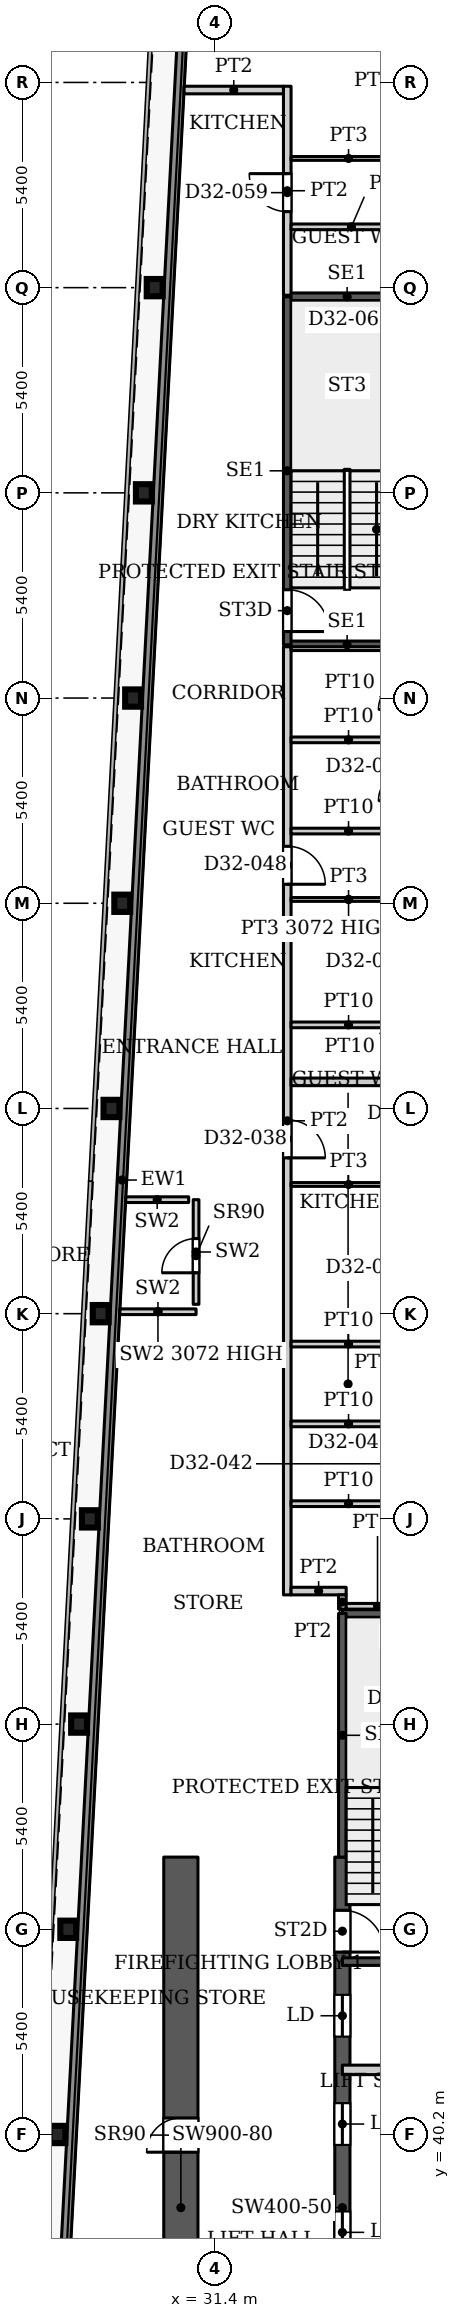
"""IFC4 building model, lengths in metres.
Left out: names, types, materials, properties, quantities, classifications, styles, units other than length and angle.
Written with IfcOpenShell. Run it as: python <this file> out.ifc"""

import sys

from ifc_helpers import new_model, si_unit, direction, frame, frame_2d, origin, origin_2d, place, context, subcontext, project, spatial, rectangle, i_section, extrude, source, transform, mapped, element, fill, save


model = new_model("IFC4")
c1 = context("Model", 3, precision=1e-05, world=origin(), true_north=direction((0.0, 1.0)))
c2 = subcontext(c1, "Body", "Model", "MODEL_VIEW")
j1 = project(units=[si_unit("LENGTHUNIT", "METRE"), si_unit("PLANEANGLEUNIT", "RADIAN")], contexts=[c1])
p1 = place(None, origin())
s1 = spatial("IfcSite", under=j1, at=p1, CompositionType="ELEMENT")
p2 = place(p1, origin())
s2 = spatial("IfcBuilding", under=s1, at=p2, CompositionType="ELEMENT")
p3 = place(p2, frame((0.0, 0.0, 140.9)))
s3 = spatial("IfcBuildingStorey", under=s2, at=p3, CompositionType="ELEMENT", Elevation=140.9)
for number, where, z_axis, x_axis in (
    (1, (27.253, 40.2, 0.0), (0.0, 0.0, 1.0), (1.0, 0.0, 0.0)),
    (2, (27.537, 45.6, 0.0), (0.0, 0.0, 1.0), (1.0, 0.0, 0.0)),
    (3, (27.822, 51.0, 0.0), (0.0, 0.0, 1.0), (1.0, 0.0, 0.0)),
    (4, (28.106, 56.4, 0.0), (0.0, 0.0, 1.0), (1.0, 0.0, 0.0)),
    (5, (28.39, 61.8, 0.0), (0.0, 0.0, 1.0), (1.0, 0.0, 0.0)),
    (6, (28.674, 67.2, 0.0), (0.0, 0.0, 1.0), (1.0, 0.0, 0.0)),
    (7, (28.958, 72.6, 0.0), (0.0, 0.0, 1.0), (1.0, 0.0, 0.0)),
    (8, (29.243, 78.0, 0.0), (0.0, 0.0, 1.0), (1.0, 0.0, 0.0)),
    (9, (29.527, 83.4, 0.0), (0.0, 0.0, 1.0), (1.0, 0.0, 0.0)),
    (10, (29.811, 88.8, 0.0), (0.0, 0.0, 1.0), (1.0, 0.0, 0.0)),
):
    element("IfcColumn", number, at=place(p3, frame(where, z_axis=z_axis, x_axis=x_axis)), inside=s3, PredefinedType="COLUMN", context=c2, shape_type="SweptSolid", body=[
        extrude(i_section(OverallWidth=0.418, OverallDepth=0.455, WebThickness=0.042, FlangeThickness=0.068, FilletRadius=0.014, at=origin_2d()), origin(), (0.0, 0.0, 1.0), 3.9),
    ])
p4 = place(p3, frame((34.75, 29.05, 0.0), z_axis=(0.0, 0.0, 1.0), x_axis=(0.0, 1.0, 0.0)))
e11 = element("IfcWall", 11, at=p4, inside=s3, PredefinedType="SHEAR", context=c2, shape_type="SweptSolid", body=[
    extrude(rectangle(XDim=18.45, YDim=0.4, at=frame_2d((9.225, 0.0))), origin(), (0.0, 0.0, 1.0), 3.9),
])
p5 = place(p4, frame((8.025, 0.0, 0.0)))
e12 = element("IfcOpeningElement", 12, at=p5, cuts=e11, PredefinedType="OPENING", context=c2, shape_type="SweptSolid", body=[
    extrude(rectangle(XDim=1.1, YDim=2.2, at=frame_2d((0.55, 1.1))), frame((0.0, 0.21, 0.0), z_axis=(0.0, -1.0, 0.0), x_axis=(1.0, 0.0, 0.0)), (0.0, 0.0, 1.0), 0.42),
])
p6 = place(p4, frame((10.875, 0.0, 0.0)))
e13 = element("IfcOpeningElement", 13, at=p6, cuts=e11, PredefinedType="OPENING", context=c2, shape_type="SweptSolid", body=[
    extrude(rectangle(XDim=1.1, YDim=2.2, at=frame_2d((0.55, 1.1))), frame((0.0, 0.21, 0.0), z_axis=(0.0, -1.0, 0.0), x_axis=(1.0, 0.0, 0.0)), (0.0, 0.0, 1.0), 0.42),
])
p7 = place(p4, frame((13.725, 0.0, 0.0)))
e14 = element("IfcOpeningElement", 14, at=p7, cuts=e11, PredefinedType="OPENING", context=c2, shape_type="SweptSolid", body=[
    extrude(rectangle(XDim=1.1, YDim=2.2, at=frame_2d((0.55, 1.1))), frame((0.0, 0.21, 0.0), z_axis=(0.0, -1.0, 0.0), x_axis=(1.0, 0.0, 0.0)), (0.0, 0.0, 1.0), 0.42),
])
p8 = place(p4, frame((15.95, 0.0, 0.0)))
e15 = element("IfcOpeningElement", 15, at=p8, cuts=e11, PredefinedType="OPENING", context=c2, shape_type="SweptSolid", body=[
    extrude(rectangle(XDim=1.1, YDim=2.2, at=frame_2d((0.55, 1.1))), frame((0.0, 0.21, 0.0), z_axis=(0.0, -1.0, 0.0), x_axis=(1.0, 0.0, 0.0)), (0.0, 0.0, 1.0), 0.42),
])
p9 = place(p3, frame((30.5, 29.05, 0.0), z_axis=(0.0, 0.0, 1.0), x_axis=(0.0, 1.0, 0.0)))
e16 = element("IfcWall", 16, at=p9, inside=s3, PredefinedType="SHEAR", context=c2, shape_type="SweptSolid", body=[
    extrude(rectangle(XDim=18.45, YDim=0.9, at=frame_2d((9.225, 0.0))), origin(), (0.0, 0.0, 1.0), 3.9),
])
p10 = place(p9, frame((6.21, 0.0, 0.0)))
e17 = element("IfcOpeningElement", 17, at=p10, cuts=e16, PredefinedType="OPENING", context=c2, shape_type="SweptSolid", body=[
    extrude(rectangle(XDim=0.9, YDim=2.2, at=frame_2d((0.45, 1.1))), frame((0.0, 0.46, 0.0), z_axis=(0.0, -1.0, 0.0), x_axis=(1.0, 0.0, 0.0)), (0.0, 0.0, 1.0), 0.92),
])
p11 = place(p9, frame((10.684, 0.0, 0.0)))
e18 = element("IfcOpeningElement", 18, at=p11, cuts=e16, PredefinedType="OPENING", context=c2, shape_type="SweptSolid", body=[
    extrude(rectangle(XDim=0.9, YDim=2.2, at=frame_2d((0.45, 1.1))), frame((0.0, 0.46, 0.0), z_axis=(0.0, -1.0, 0.0), x_axis=(1.0, 0.0, 0.0)), (0.0, 0.0, 1.0), 0.92),
])
p12 = place(p3, frame((27.195, 31.969, 0.0), z_axis=(0.0, 0.0, 1.0), x_axis=(0.052554995867, 0.998618031286, 0.0)))
e19 = element("IfcWall", 19, at=p12, inside=s3, PredefinedType="SOLIDWALL", context=c2, shape_type="SweptSolid", body=[
    extrude(rectangle(XDim=66.787, YDim=0.25, at=frame_2d((33.394, 0.0))), origin(), (0.0, 0.0, 1.0), 3.75),
])
for number, where, z_axis, x_axis in (
    (20, (34.75, 44.75, 0.0), (0.0, 0.0, 1.0), (1.0, 0.0, 0.0)),
    (21, (34.75, 53.91, 0.0), (0.0, 0.0, 1.0), (1.0, 0.0, 0.0)),
):
    element("IfcWall", number, at=place(p3, frame(where, z_axis=z_axis, x_axis=x_axis)), inside=s3, PredefinedType="SHEAR", context=c2, shape_type="SweptSolid", body=[
        extrude(rectangle(XDim=3.15, YDim=0.2, at=frame_2d((1.575, 0.0))), origin(), (0.0, 0.0, 1.0), 3.9),
    ])
p13 = place(p3, frame((34.75, 47.5, 0.0), z_axis=(0.0, 0.0, 1.0), x_axis=(0.0, 1.0, 0.0)))
e22 = element("IfcWall", 22, at=p13, inside=s3, PredefinedType="SHEAR", context=c2, shape_type="SweptSolid", body=[
    extrude(rectangle(XDim=6.41, YDim=0.2, at=frame_2d((3.205, 0.0))), origin(), (0.0, 0.0, 1.0), 3.9),
])
for number, where, z_axis, x_axis in (
    (23, (33.3, 79.4, 0.0), (0.0, 0.0, 1.0), (1.0, 0.0, 0.0)),
    (24, (33.3, 88.56, 0.0), (0.0, 0.0, 1.0), (1.0, 0.0, 0.0)),
):
    element("IfcWall", number, at=place(p3, frame(where, z_axis=z_axis, x_axis=x_axis)), inside=s3, PredefinedType="SHEAR", context=c2, shape_type="SweptSolid", body=[
        extrude(rectangle(XDim=3.15, YDim=0.2, at=frame_2d((1.575, 0.0))), origin(), (0.0, 0.0, 1.0), 3.9),
    ])
p14 = place(p3, frame((33.3, 79.4, 0.0), z_axis=(0.0, 0.0, 1.0), x_axis=(0.0, 1.0, 0.0)))
e25 = element("IfcWall", 25, at=p14, inside=s3, PredefinedType="SHEAR", context=c2, shape_type="SweptSolid", body=[
    extrude(rectangle(XDim=9.16, YDim=0.2, at=frame_2d((4.58, 0.0))), origin(), (0.0, 0.0, 1.0), 3.9),
])
p15 = place(p14, frame((0.35, 0.0, 0.0)))
e26 = element("IfcOpeningElement", 26, at=p15, cuts=e25, PredefinedType="OPENING", context=c2, shape_type="SweptSolid", body=[
    extrude(rectangle(XDim=1.1, YDim=2.2, at=frame_2d((0.55, 1.1))), frame((0.0, 0.11, 0.0), z_axis=(0.0, -1.0, 0.0), x_axis=(1.0, 0.0, 0.0)), (0.0, 0.0, 1.0), 0.22),
])
p16 = place(p3, frame((34.75, 41.9, 0.0), z_axis=(0.0, 0.0, 1.0), x_axis=(1.0, 0.0, 0.0)))
e27 = element("IfcWall", 27, at=p16, inside=s3, PredefinedType="PARTITIONING", context=c2, shape_type="SweptSolid", body=[
    extrude(rectangle(XDim=3.25, YDim=0.25, at=frame_2d((1.625, 0.0))), origin(), (0.0, 0.0, 1.0), 3.9),
])
p17 = place(p3, frame((28.895, 61.851, 0.0), z_axis=(0.0, 0.0, 1.0), x_axis=(1.0, 0.0, 0.0)))
e28 = element("IfcWall", 28, at=p17, inside=s3, PredefinedType="PARTITIONING", context=c2, shape_type="SweptSolid", body=[
    extrude(rectangle(XDim=2.005, YDim=0.15, at=frame_2d((1.002, 0.0))), origin(), (0.0, 0.0, 1.0), 3.072),
])
p18 = place(p3, frame((30.9, 62.046, 0.0), z_axis=(0.0, 0.0, 1.0), x_axis=(0.0, 1.0, 0.0)))
e29 = element("IfcWall", 29, at=p18, inside=s3, PredefinedType="PARTITIONING", context=c2, shape_type="SweptSolid", body=[
    extrude(rectangle(XDim=2.754, YDim=0.15, at=frame_2d((1.377, 0.0))), origin(), (0.0, 0.0, 1.0), 3.9),
])
p19 = place(p18, frame((0.83, 0.0, 0.0)))
e30 = element("IfcOpeningElement", 30, at=p19, cuts=e29, PredefinedType="OPENING", context=c2, shape_type="SweptSolid", body=[
    extrude(rectangle(XDim=0.9, YDim=2.2, at=frame_2d((0.45, 1.1))), frame((0.0, 0.085, 0.0), z_axis=(0.0, -1.0, 0.0), x_axis=(1.0, 0.0, 0.0)), (0.0, 0.0, 1.0), 0.17),
])
p20 = place(p3, frame((29.05, 64.8, 0.0), z_axis=(0.0, 0.0, 1.0), x_axis=(1.0, 0.0, 0.0)))
e31 = element("IfcWall", 31, at=p20, inside=s3, PredefinedType="PARTITIONING", context=c2, shape_type="SweptSolid", body=[
    extrude(rectangle(XDim=1.655, YDim=0.15, at=frame_2d((0.828, 0.0))), origin(), (0.0, 0.0, 1.0), 3.9),
])
p21 = place(p3, frame((30.585, 94.0, 0.0), z_axis=(0.0, 0.0, 1.0), x_axis=(1.0, 0.0, 0.0)))
e32 = element("IfcWall", 32, at=p21, inside=s3, PredefinedType="PARTITIONING", context=c2, shape_type="SweptSolid", body=[
    extrude(rectangle(XDim=2.615, YDim=0.2, at=frame_2d((1.308, 0.0))), origin(), (0.0, 0.0, 1.0), 3.6),
])
p22 = place(p3, frame((33.3, 54.4, 0.0), z_axis=(0.0, 0.0, 1.0), x_axis=(0.0, 1.0, 0.0)))
e33 = element("IfcWall", 33, at=p22, inside=s3, PredefinedType="PARTITIONING", context=c2, shape_type="SweptSolid", body=[
    extrude(rectangle(XDim=24.95, YDim=0.2, at=frame_2d((12.475, 0.0))), origin(), (0.0, 0.0, 1.0), 3.6),
])
p23 = place(p22, frame((11.5, 0.0, 0.0)))
e34 = element("IfcOpeningElement", 34, at=p23, cuts=e33, PredefinedType="OPENING", context=c2, shape_type="SweptSolid", body=[
    extrude(rectangle(XDim=1.0, YDim=2.1, at=frame_2d((0.5, 1.05))), frame((0.0, 0.11, 0.0), z_axis=(0.0, -1.0, 0.0), x_axis=(1.0, 0.0, 0.0)), (0.0, 0.0, 1.0), 0.22),
])
p24 = place(p22, frame((18.7, 0.0, 0.0)))
e35 = element("IfcOpeningElement", 35, at=p24, cuts=e33, PredefinedType="OPENING", context=c2, shape_type="SweptSolid", body=[
    extrude(rectangle(XDim=1.0, YDim=2.1, at=frame_2d((0.5, 1.05))), frame((0.0, 0.11, 0.0), z_axis=(0.0, -1.0, 0.0), x_axis=(1.0, 0.0, 0.0)), (0.0, 0.0, 1.0), 0.22),
])
p25 = place(p3, frame((33.3, 88.6, 0.0), z_axis=(0.0, 0.0, 1.0), x_axis=(0.0, 1.0, 0.0)))
e36 = element("IfcWall", 36, at=p25, inside=s3, PredefinedType="PARTITIONING", context=c2, shape_type="SweptSolid", body=[
    extrude(rectangle(XDim=5.5, YDim=0.2, at=frame_2d((2.75, 0.0))), origin(), (0.0, 0.0, 1.0), 3.6),
])
p26 = place(p25, frame((2.2, 0.0, 0.0)))
e37 = element("IfcOpeningElement", 37, at=p26, cuts=e36, PredefinedType="OPENING", context=c2, shape_type="SweptSolid", body=[
    extrude(rectangle(XDim=1.0, YDim=2.1, at=frame_2d((0.5, 1.05))), frame((0.0, 0.11, 0.0), z_axis=(0.0, -1.0, 0.0), x_axis=(1.0, 0.0, 0.0)), (0.0, 0.0, 1.0), 0.22),
])
p27 = place(p3, frame((33.4, 54.5, 0.0), z_axis=(0.0, 0.0, 1.0), x_axis=(1.0, 0.0, 0.0)))
e38 = element("IfcWall", 38, at=p27, inside=s3, PredefinedType="PARTITIONING", context=c2, shape_type="SweptSolid", body=[
    extrude(rectangle(XDim=1.45, YDim=0.2, at=frame_2d((0.725, 0.0))), origin(), (0.0, 0.0, 1.0), 3.6),
])
for number, where, z_axis, x_axis in (
    (39, (33.4, 56.8, 0.0), (0.0, 0.0, 1.0), (1.0, 0.0, 0.0)),
    (40, (33.4, 58.9, 0.0), (0.0, 0.0, 1.0), (1.0, 0.0, 0.0)),
    (41, (33.4, 61.0, 0.0), (0.0, 0.0, 1.0), (1.0, 0.0, 0.0)),
):
    element("IfcWall", number, at=place(p3, frame(where, z_axis=z_axis, x_axis=x_axis)), inside=s3, PredefinedType="PARTITIONING", context=c2, shape_type="SweptSolid", body=[
        extrude(rectangle(XDim=3.025, YDim=0.15, at=frame_2d((1.513, 0.0))), origin(), (0.0, 0.0, 1.0), 3.6),
    ])
p28 = place(p3, frame((33.4, 65.2, 0.0), z_axis=(0.0, 0.0, 1.0), x_axis=(1.0, 0.0, 0.0)))
e42 = element("IfcWall", 42, at=p28, inside=s3, PredefinedType="PARTITIONING", context=c2, shape_type="SweptSolid", body=[
    extrude(rectangle(XDim=3.025, YDim=0.1, at=frame_2d((1.513, 0.0))), origin(), (0.0, 0.0, 1.0), 3.6),
])
p29 = place(p3, frame((33.4, 67.9, 0.0), z_axis=(0.0, 0.0, 1.0), x_axis=(1.0, 0.0, 0.0)))
e43 = element("IfcWall", 43, at=p29, inside=s3, PredefinedType="PARTITIONING", context=c2, shape_type="SweptSolid", body=[
    extrude(rectangle(XDim=12.5, YDim=0.2, at=frame_2d((6.25, 0.0))), origin(), (0.0, 0.0, 1.0), 3.6),
])
p30 = place(p3, frame((33.4, 69.4, 0.0), z_axis=(0.0, 0.0, 1.0), x_axis=(1.0, 0.0, 0.0)))
e44 = element("IfcWall", 44, at=p30, inside=s3, PredefinedType="PARTITIONING", context=c2, shape_type="SweptSolid", body=[
    extrude(rectangle(XDim=3.025, YDim=0.15, at=frame_2d((1.513, 0.0))), origin(), (0.0, 0.0, 1.0), 3.6),
])
p31 = place(p3, frame((33.4, 72.7, 0.0), z_axis=(0.0, 0.0, 1.0), x_axis=(1.0, 0.0, 0.0)))
e45 = element("IfcWall", 45, at=p31, inside=s3, PredefinedType="PARTITIONING", context=c2, shape_type="SweptSolid", body=[
    extrude(rectangle(XDim=3.025, YDim=0.1, at=frame_2d((1.513, 0.0))), origin(), (0.0, 0.0, 1.0), 3.072),
])
for number, where, z_axis, x_axis in (
    (46, (33.4, 74.5, 0.0), (0.0, 0.0, 1.0), (1.0, 0.0, 0.0)),
    (47, (33.4, 76.9, 0.0), (0.0, 0.0, 1.0), (1.0, 0.0, 0.0)),
):
    element("IfcWall", number, at=place(p3, frame(where, z_axis=z_axis, x_axis=x_axis)), inside=s3, PredefinedType="PARTITIONING", context=c2, shape_type="SweptSolid", body=[
        extrude(rectangle(XDim=3.025, YDim=0.15, at=frame_2d((1.513, 0.0))), origin(), (0.0, 0.0, 1.0), 3.6),
    ])
p32 = place(p3, frame((33.4, 79.3, 0.0), z_axis=(0.0, 0.0, 1.0), x_axis=(1.0, 0.0, 0.0)))
e48 = element("IfcWall", 48, at=p32, inside=s3, PredefinedType="PARTITIONING", context=c2, shape_type="SweptSolid", body=[
    extrude(rectangle(XDim=12.5, YDim=0.1, at=frame_2d((6.25, 0.0))), origin(), (0.0, 0.0, 1.0), 3.6),
])
p33 = place(p32, frame((3.355, 0.0, 0.0)))
e49 = element("IfcOpeningElement", 49, at=p33, cuts=e48, PredefinedType="OPENING", context=c2, shape_type="SweptSolid", body=[
    extrude(rectangle(XDim=0.9, YDim=2.1, at=frame_2d((0.45, 1.05))), frame((0.0, 0.06, 0.0), z_axis=(0.0, -1.0, 0.0), x_axis=(1.0, 0.0, 0.0)), (0.0, 0.0, 1.0), 0.12),
])
p34 = place(p3, frame((33.4, 90.4, 0.0), z_axis=(0.0, 0.0, 1.0), x_axis=(1.0, 0.0, 0.0)))
e50 = element("IfcWall", 50, at=p34, inside=s3, PredefinedType="PARTITIONING", context=c2, shape_type="SweptSolid", body=[
    extrude(rectangle(XDim=3.175, YDim=0.15, at=frame_2d((1.587, 0.0))), origin(), (0.0, 0.0, 1.0), 3.6),
])
p35 = place(p3, frame((33.4, 92.2, 0.0), z_axis=(0.0, 0.0, 1.0), x_axis=(1.0, 0.0, 0.0)))
e51 = element("IfcWall", 51, at=p35, inside=s3, PredefinedType="PARTITIONING", context=c2, shape_type="SweptSolid", body=[
    extrude(rectangle(XDim=3.025, YDim=0.1, at=frame_2d((1.513, 0.0))), origin(), (0.0, 0.0, 1.0), 3.6),
])
p36 = place(p3, frame((34.75, 54.025, 0.0), z_axis=(0.0, 0.0, 1.0), x_axis=(0.0, 1.0, 0.0)))
e52 = element("IfcWall", 52, at=p36, inside=s3, PredefinedType="PARTITIONING", context=c2, shape_type="SweptSolid", body=[
    extrude(rectangle(XDim=0.375, YDim=0.2, at=frame_2d((0.188, 0.0))), origin(), (0.0, 0.0, 1.0), 3.6),
])
p37 = place(p3, frame((34.85, 54.1, 0.0), z_axis=(0.0, 0.0, 1.0), x_axis=(1.0, 0.0, 0.0)))
e53 = element("IfcWall", 53, at=p37, inside=s3, PredefinedType="PARTITIONING", context=c2, shape_type="SweptSolid", body=[
    extrude(rectangle(XDim=1.65, YDim=0.15, at=frame_2d((0.825, 0.0))), origin(), (0.0, 0.0, 1.0), 3.6),
])
m1 = source(origin(), c2, "Body", "SweptSolid", [
    extrude(rectangle(XDim=1.1, YDim=2.2, at=frame_2d((0.55, 1.1))), frame((0.0, 0.025, 0.0), z_axis=(0.0, -1.0, 0.0), x_axis=(1.0, 0.0, 0.0)), (0.0, 0.0, 1.0), 0.05),
])
p38 = place(p5, origin())
e54 = element("IfcDoor", 54, at=p38, inside=s3, OperationType="SLIDING_TO_LEFT", PredefinedType="DOOR", context=c2, shape_type="MappedRepresentation", body=[
    mapped(m1, transform((0.0, 0.0, 0.0), x_axis=(1.0, 0.0, 0.0), y_axis=(0.0, 1.0, 0.0), z_axis=(0.0, 0.0, 1.0), scale=1.0)),
])
fill(e12, e54)
p39 = place(p6, origin())
e55 = element("IfcDoor", 55, at=p39, inside=s3, OperationType="SLIDING_TO_LEFT", PredefinedType="DOOR", context=c2, shape_type="MappedRepresentation", body=[
    mapped(m1, transform((0.0, 0.0, 0.0), x_axis=(1.0, 0.0, 0.0), y_axis=(0.0, 1.0, 0.0), z_axis=(0.0, 0.0, 1.0), scale=1.0)),
])
fill(e13, e55)
p40 = place(p7, origin())
e56 = element("IfcDoor", 56, at=p40, inside=s3, OperationType="SLIDING_TO_LEFT", PredefinedType="DOOR", context=c2, shape_type="MappedRepresentation", body=[
    mapped(m1, transform((0.0, 0.0, 0.0), x_axis=(1.0, 0.0, 0.0), y_axis=(0.0, 1.0, 0.0), z_axis=(0.0, 0.0, 1.0), scale=1.0)),
])
fill(e14, e56)
m2 = source(origin(), c2, "Body", "SweptSolid", [
    extrude(rectangle(XDim=0.9, YDim=2.2, at=frame_2d((0.45, 1.1))), frame((0.0, 0.025, 0.0), z_axis=(0.0, -1.0, 0.0), x_axis=(1.0, 0.0, 0.0)), (0.0, 0.0, 1.0), 0.05),
])
p41 = place(p11, origin())
e57 = element("IfcDoor", 57, at=p41, inside=s3, OperationType="SINGLE_SWING_LEFT", PredefinedType="DOOR", context=c2, shape_type="MappedRepresentation", body=[
    mapped(m2, transform((0.0, 0.0, 0.0), x_axis=(1.0, 0.0, 0.0), y_axis=(0.0, 1.0, 0.0), z_axis=(0.0, 0.0, 1.0), scale=1.0)),
])
fill(e18, e57)
p42 = place(p19, origin())
e58 = element("IfcDoor", 58, at=p42, inside=s3, OperationType="SINGLE_SWING_LEFT", PredefinedType="DOOR", context=c2, shape_type="MappedRepresentation", body=[
    mapped(m2, transform((0.0, 0.0, 0.0), x_axis=(1.0, 0.0, 0.0), y_axis=(0.0, 1.0, 0.0), z_axis=(0.0, 0.0, 1.0), scale=1.0)),
])
fill(e30, e58)
m3 = source(origin(), c2, "Body", "SweptSolid", [
    extrude(rectangle(XDim=1.1, YDim=2.2, at=frame_2d((0.55, 1.1))), frame((0.0, 0.025, 0.0), z_axis=(0.0, -1.0, 0.0), x_axis=(1.0, 0.0, 0.0)), (0.0, 0.0, 1.0), 0.05),
])
p43 = place(p8, origin())
e59 = element("IfcDoor", 59, at=p43, inside=s3, OperationType="SINGLE_SWING_RIGHT", PredefinedType="DOOR", context=c2, shape_type="MappedRepresentation", body=[
    mapped(m3, transform((0.0, 0.0, 0.0), x_axis=(1.0, 0.0, 0.0), y_axis=(0.0, 1.0, 0.0), z_axis=(0.0, 0.0, 1.0), scale=1.0)),
])
fill(e15, e59)
p44 = place(p15, origin())
e60 = element("IfcDoor", 60, at=p44, inside=s3, OperationType="SINGLE_SWING_RIGHT", PredefinedType="DOOR", context=c2, shape_type="MappedRepresentation", body=[
    mapped(m3, transform((0.0, 0.0, 0.0), x_axis=(1.0, 0.0, 0.0), y_axis=(0.0, 1.0, 0.0), z_axis=(0.0, 0.0, 1.0), scale=1.0)),
])
fill(e26, e60)
m4 = source(origin(), c2, "Body", "SweptSolid", [
    extrude(rectangle(XDim=1.0, YDim=2.1, at=frame_2d((0.5, 1.05))), frame((0.0, 0.025, 0.0), z_axis=(0.0, -1.0, 0.0), x_axis=(1.0, 0.0, 0.0)), (0.0, 0.0, 1.0), 0.05),
])
p45 = place(p23, origin())
e61 = element("IfcDoor", 61, at=p45, inside=s3, OperationType="SINGLE_SWING_RIGHT", PredefinedType="DOOR", context=c2, shape_type="MappedRepresentation", body=[
    mapped(m4, transform((0.0, 0.0, 0.0), x_axis=(1.0, 0.0, 0.0), y_axis=(0.0, 1.0, 0.0), z_axis=(0.0, 0.0, 1.0), scale=1.0)),
])
fill(e34, e61)
p46 = place(p24, origin())
e62 = element("IfcDoor", 62, at=p46, inside=s3, OperationType="SINGLE_SWING_RIGHT", PredefinedType="DOOR", context=c2, shape_type="MappedRepresentation", body=[
    mapped(m4, transform((0.0, 0.0, 0.0), x_axis=(1.0, 0.0, 0.0), y_axis=(0.0, 1.0, 0.0), z_axis=(0.0, 0.0, 1.0), scale=1.0)),
])
fill(e35, e62)
p47 = place(p26, origin())
e63 = element("IfcDoor", 63, at=p47, inside=s3, OperationType="SINGLE_SWING_LEFT", PredefinedType="DOOR", context=c2, shape_type="MappedRepresentation", body=[
    mapped(m4, transform((0.0, 0.0, 0.0), x_axis=(1.0, 0.0, 0.0), y_axis=(0.0, 1.0, 0.0), z_axis=(0.0, 0.0, 1.0), scale=1.0)),
])
fill(e37, e63)
save(model, sys.argv[1])
